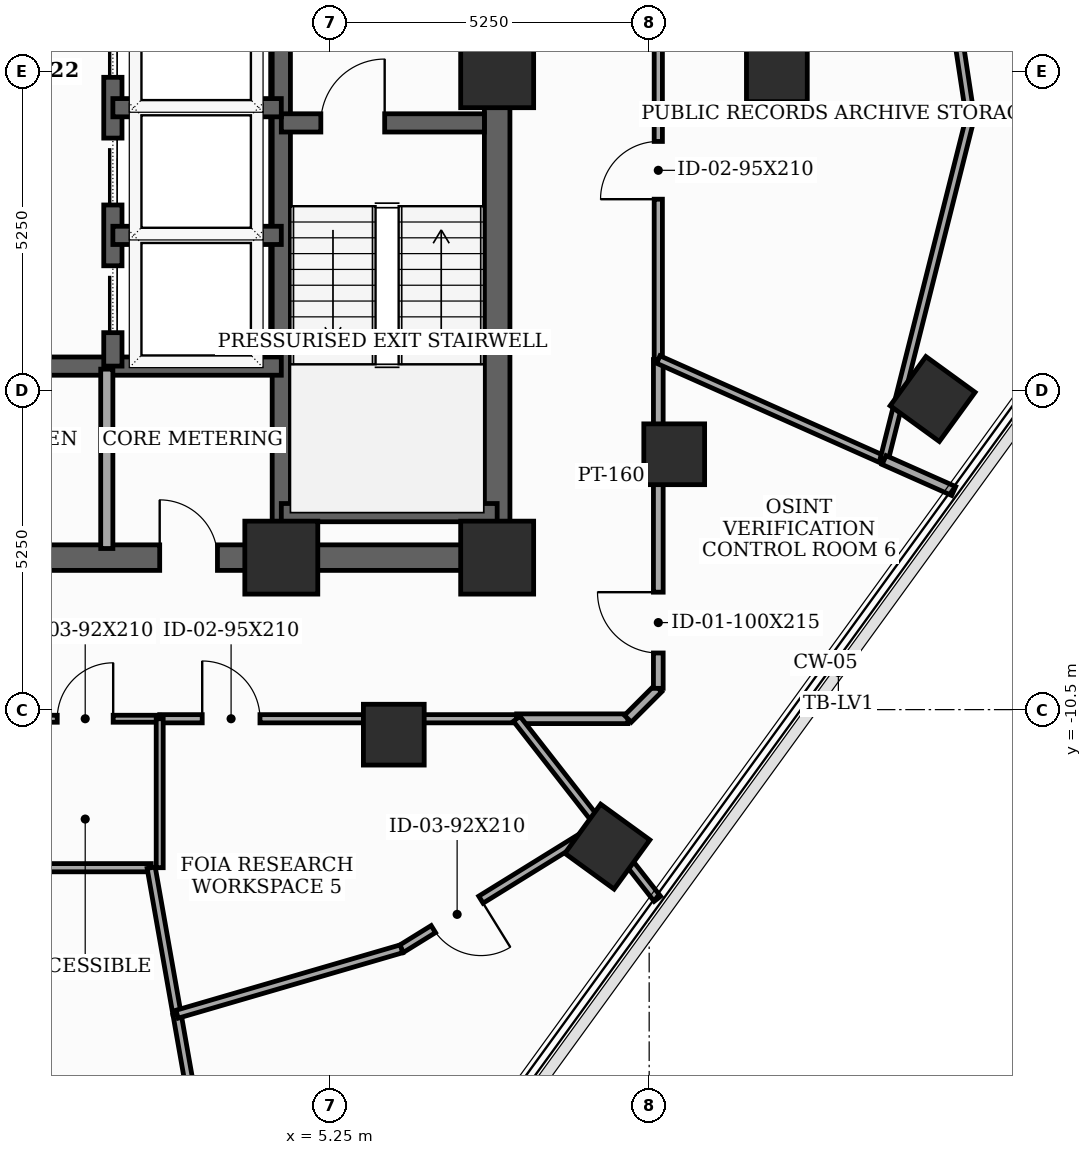
"""IFC4 building model, lengths in metres.
Left out: names, types, materials, properties, quantities, classifications, styles, units other than length and angle.
Written with IfcOpenShell. Run it as: python <this file> out.ifc"""

import sys

from ifc_helpers import new_model, si_unit, direction, frame, frame_2d, origin, origin_2d, place, context, subcontext, project, spatial, rectangle, extrude, element, fill, save


model = new_model("IFC4")
c1 = context("Model", 3, precision=1e-05, world=origin(), true_north=direction((0.0, 1.0)))
c2 = subcontext(c1, "Body", "Model", "MODEL_VIEW")
j1 = project(units=[si_unit("LENGTHUNIT", "METRE"), si_unit("PLANEANGLEUNIT", "RADIAN")], contexts=[c1])
p1 = place(None, origin())
s1 = spatial("IfcSite", under=j1, at=p1, CompositionType="ELEMENT")
p2 = place(p1, origin())
s2 = spatial("IfcBuilding", under=s1, at=p2, CompositionType="ELEMENT")
p3 = place(p2, frame((0.0, 0.0, 233.7)))
s3 = spatial("IfcBuildingStorey", under=s2, at=p3, CompositionType="ELEMENT", Elevation=233.7)
for number, where, z_axis, x_axis in (
    (1, (4.45, -8.0, 0.0), (0.0, 0.0, 1.0), (1.0, 0.0, 0.0)),
    (2, (8.0, -8.0, 0.0), (0.0, 0.0, 1.0), (1.0, 0.0, 0.0)),
    (3, (8.0, 0.0, 0.0), (0.0, 0.0, 1.0), (1.0, 0.0, 0.0)),
):
    element("IfcColumn", number, at=place(p3, frame(where, z_axis=z_axis, x_axis=x_axis)), inside=s3, PredefinedType="COLUMN", context=c2, shape_type="SweptSolid", body=[
        extrude(rectangle(XDim=1.2, YDim=1.2, at=origin_2d()), origin(), (0.0, 0.0, 1.0), 3.7),
    ])
for number, where, z_axis, x_axis in (
    (4, (12.6, 0.0, 0.0), (0.0, 0.0, 1.0), (1.0, 0.0, 0.0)),
    (5, (6.3, -10.912, 0.0), (0.0, 0.0, 1.0), (1.0, 0.0, 0.0)),
    (6, (10.912, -6.3, 0.0), (0.0, 0.0, 1.0), (1.0, 0.0, 0.0)),
    (7, (9.812, -12.753, 0.0), (0.0, 0.0, 1.0), (0.588, 0.809, 0.0)),
    (8, (15.161, -5.391, 0.0), (0.0, 0.0, 1.0), (0.588, 0.809, 0.0)),
):
    element("IfcColumn", number, at=place(p3, frame(where, z_axis=z_axis, x_axis=x_axis)), inside=s3, PredefinedType="COLUMN", context=c2, shape_type="SweptSolid", body=[
        extrude(rectangle(XDim=1.0, YDim=1.0, at=origin_2d()), origin(), (0.0, 0.0, 1.0), 3.7),
    ])
p4 = place(p3, frame((8.0, -8.0, 0.0), z_axis=(0.0, 0.0, 1.0), x_axis=(0.0, 1.0, 0.0)))
e9 = element("IfcWall", 9, at=p4, inside=s3, PredefinedType="SHEAR", context=c2, shape_type="SweptSolid", body=[
    extrude(rectangle(XDim=16.0, YDim=0.42, at=frame_2d((8.0, 0.0))), origin(), (0.0, 0.0, 1.0), 3.5),
])
p5 = place(p4, frame((9.6, 0.0, 0.0)))
e10 = element("IfcOpeningElement", 10, at=p5, cuts=e9, PredefinedType="OPENING", context=c2, shape_type="SweptSolid", body=[
    extrude(rectangle(XDim=1.05, YDim=2.15, at=frame_2d((0.525, 1.075))), frame((0.0, 0.22, 0.0), z_axis=(0.0, -1.0, 0.0), x_axis=(1.0, 0.0, 0.0)), (0.0, 0.0, 1.0), 0.44),
])
p6 = place(p4, frame((14.389, 0.0, 0.0)))
e11 = element("IfcOpeningElement", 11, at=p6, cuts=e9, PredefinedType="OPENING", context=c2, shape_type="SweptSolid", body=[
    extrude(rectangle(XDim=0.85, YDim=2.02, at=frame_2d((0.425, 1.01))), frame((0.0, 0.22, 0.0), z_axis=(0.0, -1.0, 0.0), x_axis=(1.0, 0.0, 0.0)), (0.0, 0.0, 1.0), 0.44),
])
p7 = place(p3, frame((-8.0, -8.0, 0.0), z_axis=(0.0, 0.0, 1.0), x_axis=(1.0, 0.0, 0.0)))
e12 = element("IfcWall", 12, at=p7, inside=s3, PredefinedType="SHEAR", context=c2, shape_type="SweptSolid", body=[
    extrude(rectangle(XDim=16.0, YDim=0.42, at=frame_2d((8.0, 0.0))), origin(), (0.0, 0.0, 1.0), 3.5),
])
p8 = place(p7, frame((4.6, 0.0, 0.0)))
e13 = element("IfcOpeningElement", 13, at=p8, cuts=e12, PredefinedType="OPENING", context=c2, shape_type="SweptSolid", body=[
    extrude(rectangle(XDim=0.95, YDim=2.1, at=frame_2d((0.475, 1.05))), frame((0.0, 0.22, 0.0), z_axis=(0.0, -1.0, 0.0), x_axis=(1.0, 0.0, 0.0)), (0.0, 0.0, 1.0), 0.44),
])
p9 = place(p7, frame((7.52, 0.0, 0.0)))
e14 = element("IfcOpeningElement", 14, at=p9, cuts=e12, PredefinedType="OPENING", context=c2, shape_type="SweptSolid", body=[
    extrude(rectangle(XDim=0.95, YDim=2.1, at=frame_2d((0.475, 1.05))), frame((0.0, 0.22, 0.0), z_axis=(0.0, -1.0, 0.0), x_axis=(1.0, 0.0, 0.0)), (0.0, 0.0, 1.0), 0.44),
])
p10 = place(p7, frame((10.45, 0.0, 0.0)))
e15 = element("IfcOpeningElement", 15, at=p10, cuts=e12, PredefinedType="OPENING", context=c2, shape_type="SweptSolid", body=[
    extrude(rectangle(XDim=0.95, YDim=2.1, at=frame_2d((0.475, 1.05))), frame((0.0, 0.22, 0.0), z_axis=(0.0, -1.0, 0.0), x_axis=(1.0, 0.0, 0.0)), (0.0, 0.0, 1.0), 0.44),
])
p11 = place(p3, frame((4.45, -7.79, 0.0), z_axis=(0.0, 0.0, 1.0), x_axis=(0.0, 1.0, 0.0)))
e16 = element("IfcWall", 16, at=p11, inside=s3, PredefinedType="SHEAR", context=c2, shape_type="SweptSolid", body=[
    extrude(rectangle(XDim=15.58, YDim=0.3, at=frame_2d((7.79, 0.0))), origin(), (0.0, 0.0, 1.0), 3.5),
])
p12 = place(p3, frame((4.45, -0.85, 0.0), z_axis=(0.0, 0.0, 1.0), x_axis=(1.0, 0.0, 0.0)))
e17 = element("IfcWall", 17, at=p12, inside=s3, PredefinedType="SHEAR", context=c2, shape_type="SweptSolid", body=[
    extrude(rectangle(XDim=3.34, YDim=0.3, at=frame_2d((1.67, 0.0))), origin(), (0.0, 0.0, 1.0), 3.5),
])
p13 = place(p12, frame((0.65, 0.0, 0.0)))
e18 = element("IfcOpeningElement", 18, at=p13, cuts=e17, PredefinedType="OPENING", context=c2, shape_type="SweptSolid", body=[
    extrude(rectangle(XDim=1.05, YDim=2.15, at=frame_2d((0.525, 1.075))), frame((0.0, 0.16, 0.0), z_axis=(0.0, -1.0, 0.0), x_axis=(1.0, 0.0, 0.0)), (0.0, 0.0, 1.0), 0.32),
])
p14 = place(p3, frame((4.45, -7.26, 0.0), z_axis=(0.0, 0.0, 1.0), x_axis=(1.0, 0.0, 0.0)))
e19 = element("IfcWall", 19, at=p14, inside=s3, PredefinedType="SHEAR", context=c2, shape_type="SweptSolid", body=[
    extrude(rectangle(XDim=3.55, YDim=0.3, at=frame_2d((1.775, 0.0))), origin(), (0.0, 0.0, 1.0), 3.5),
])
p15 = place(p3, frame((-4.45, -4.85, 0.0), z_axis=(0.0, 0.0, 1.0), x_axis=(1.0, 0.0, 0.0)))
e20 = element("IfcWall", 20, at=p15, inside=s3, PredefinedType="SHEAR", context=c2, shape_type="SweptSolid", body=[
    extrude(rectangle(XDim=8.9, YDim=0.3, at=frame_2d((4.45, 0.0))), origin(), (0.0, 0.0, 1.0), 3.5),
])
p16 = place(p3, frame((1.68, -4.85, 0.0), z_axis=(0.0, 0.0, 1.0), x_axis=(0.0, 1.0, 0.0)))
e21 = element("IfcWall", 21, at=p16, inside=s3, PredefinedType="SHEAR", context=c2, shape_type="SweptSolid", body=[
    extrude(rectangle(XDim=12.64, YDim=0.3, at=frame_2d((6.32, 0.0))), origin(), (0.0, 0.0, 1.0), 3.5),
])
p17 = place(p16, frame((0.55, 0.0, 0.0)))
e22 = element("IfcOpeningElement", 22, at=p17, cuts=e21, PredefinedType="OPENING", context=c2, shape_type="SweptSolid", body=[
    extrude(rectangle(XDim=1.1, YDim=2.1, at=frame_2d((0.55, 1.05))), frame((0.0, 0.16, 0.0), z_axis=(0.0, -1.0, 0.0), x_axis=(1.0, 0.0, 0.0)), (0.0, 0.0, 1.0), 0.32),
])
p18 = place(p16, frame((2.65, 0.0, 0.0)))
e23 = element("IfcOpeningElement", 23, at=p18, cuts=e21, PredefinedType="OPENING", context=c2, shape_type="SweptSolid", body=[
    extrude(rectangle(XDim=1.1, YDim=2.1, at=frame_2d((0.55, 1.05))), frame((0.0, 0.16, 0.0), z_axis=(0.0, -1.0, 0.0), x_axis=(1.0, 0.0, 0.0)), (0.0, 0.0, 1.0), 0.32),
])
p19 = place(p16, frame((4.75, 0.0, 0.0)))
e24 = element("IfcOpeningElement", 24, at=p19, cuts=e21, PredefinedType="OPENING", context=c2, shape_type="SweptSolid", body=[
    extrude(rectangle(XDim=1.1, YDim=2.1, at=frame_2d((0.55, 1.05))), frame((0.0, 0.16, 0.0), z_axis=(0.0, -1.0, 0.0), x_axis=(1.0, 0.0, 0.0)), (0.0, 0.0, 1.0), 0.32),
])
p20 = place(p16, frame((6.8, 0.0, 0.0)))
e25 = element("IfcOpeningElement", 25, at=p20, cuts=e21, PredefinedType="OPENING", context=c2, shape_type="SweptSolid", body=[
    extrude(rectangle(XDim=0.92, YDim=2.1, at=frame_2d((0.46, 1.05))), frame((0.0, 0.16, 0.0), z_axis=(0.0, -1.0, 0.0), x_axis=(1.0, 0.0, 0.0)), (0.0, 0.0, 1.0), 0.32),
])
p21 = place(p16, frame((9.8, 0.0, 0.0)))
e26 = element("IfcOpeningElement", 26, at=p21, cuts=e21, PredefinedType="OPENING", context=c2, shape_type="SweptSolid", body=[
    extrude(rectangle(XDim=0.95, YDim=2.1, at=frame_2d((0.475, 1.05))), frame((0.0, 0.16, 0.0), z_axis=(0.0, -1.0, 0.0), x_axis=(1.0, 0.0, 0.0)), (0.0, 0.0, 1.0), 0.32),
])
for number, where, z_axis, x_axis in (
    (27, (1.68, -2.7, 0.0), (0.0, 0.0, 1.0), (1.0, 0.0, 0.0)),
    (28, (1.68, -0.6, 0.0), (0.0, 0.0, 1.0), (1.0, 0.0, 0.0)),
):
    element("IfcWall", number, at=place(p3, frame(where, z_axis=z_axis, x_axis=x_axis)), inside=s3, PredefinedType="SHEAR", context=c2, shape_type="SweptSolid", body=[
        extrude(rectangle(XDim=2.77, YDim=0.3, at=frame_2d((1.385, 0.0))), origin(), (0.0, 0.0, 1.0), 3.5),
    ])
p22 = place(p3, frame((1.58, -7.85, 0.0), z_axis=(0.0, 0.0, 1.0), x_axis=(0.0, 1.0, 0.0)))
e29 = element("IfcWall", 29, at=p22, inside=s3, PredefinedType="SOLIDWALL", context=c2, shape_type="SweptSolid", body=[
    extrude(rectangle(XDim=2.95, YDim=0.2, at=frame_2d((1.475, 0.0))), origin(), (0.0, 0.0, 1.0), 2.885),
])
p23 = place(p3, frame((10.65, -4.742, 0.0), z_axis=(0.0, 0.0, 1.0), x_axis=(0.0, 1.0, 0.0)))
e30 = element("IfcWall", 30, at=p23, inside=s3, PredefinedType="PARTITIONING", context=c2, shape_type="SweptSolid", body=[
    extrude(rectangle(XDim=6.224, YDim=0.135, at=frame_2d((3.112, 0.0))), origin(), (0.0, 0.0, 1.0), 2.885),
])
p24 = place(p23, frame((2.637, 0.0, 0.0)))
e31 = element("IfcOpeningElement", 31, at=p24, cuts=e30, PredefinedType="OPENING", context=c2, shape_type="SweptSolid", body=[
    extrude(rectangle(XDim=0.95, YDim=2.1, at=frame_2d((0.475, 1.05))), frame((0.0, 0.077, 0.0), z_axis=(0.0, -1.0, 0.0), x_axis=(1.0, 0.0, 0.0)), (0.0, 0.0, 1.0), 0.155),
])
p25 = place(p3, frame((0.0, -10.65, 0.0), z_axis=(0.0, 0.0, 1.0), x_axis=(1.0, 0.0, 0.0)))
e32 = element("IfcWall", 32, at=p25, inside=s3, PredefinedType="PARTITIONING", context=c2, shape_type="SweptSolid", body=[
    extrude(rectangle(XDim=2.45, YDim=0.115, at=frame_2d((1.225, 0.0))), origin(), (0.0, 0.0, 1.0), 3.5),
])
p26 = place(p25, frame((0.765, 0.0, 0.0)))
e33 = element("IfcOpeningElement", 33, at=p26, cuts=e32, PredefinedType="OPENING", context=c2, shape_type="SweptSolid", body=[
    extrude(rectangle(XDim=0.92, YDim=2.1, at=frame_2d((0.46, 1.05))), frame((0.0, 0.067, 0.0), z_axis=(0.0, -1.0, 0.0), x_axis=(1.0, 0.0, 0.0)), (0.0, 0.0, 1.0), 0.135),
])
p27 = place(p3, frame((2.45, -10.65, 0.0), z_axis=(0.0, 0.0, 1.0), x_axis=(1.0, 0.0, 0.0)))
e34 = element("IfcWall", 34, at=p27, inside=s3, PredefinedType="PARTITIONING", context=c2, shape_type="SweptSolid", body=[
    extrude(rectangle(XDim=5.871, YDim=0.135, at=frame_2d((2.936, 0.0))), origin(), (0.0, 0.0, 1.0), 2.885),
])
p28 = place(p27, frame((0.699, 0.0, 0.0)))
e35 = element("IfcOpeningElement", 35, at=p28, cuts=e34, PredefinedType="OPENING", context=c2, shape_type="SweptSolid", body=[
    extrude(rectangle(XDim=0.95, YDim=2.1, at=frame_2d((0.475, 1.05))), frame((0.0, 0.077, 0.0), z_axis=(0.0, -1.0, 0.0), x_axis=(1.0, 0.0, 0.0)), (0.0, 0.0, 1.0), 0.155),
])
p29 = place(p3, frame((8.321, -10.65, 0.0), z_axis=(0.0, 0.0, 1.0), x_axis=(1.0, 0.0, 0.0)))
e36 = element("IfcWall", 36, at=p29, inside=s3, PredefinedType="PARTITIONING", context=c2, shape_type="SweptSolid", body=[
    extrude(rectangle(XDim=1.829, YDim=0.16, at=frame_2d((0.915, 0.0))), origin(), (0.0, 0.0, 1.0), 3.5),
])
p30 = place(p3, frame((10.15, -10.65, 0.0), z_axis=(0.0, 0.0, 1.0), x_axis=(0.707106781187, 0.707106781187, 0.0)))
e37 = element("IfcWall", 37, at=p30, inside=s3, PredefinedType="PARTITIONING", context=c2, shape_type="SweptSolid", body=[
    extrude(rectangle(XDim=0.707, YDim=0.16, at=frame_2d((0.354, 0.0))), origin(), (0.0, 0.0, 1.0), 3.5),
])
p31 = place(p3, frame((10.65, -10.15, 0.0), z_axis=(0.0, 0.0, 1.0), x_axis=(0.0, 1.0, 0.0)))
e38 = element("IfcWall", 38, at=p31, inside=s3, PredefinedType="PARTITIONING", context=c2, shape_type="SweptSolid", body=[
    extrude(rectangle(XDim=5.408, YDim=0.16, at=frame_2d((2.704, 0.0))), origin(), (0.0, 0.0, 1.0), 2.885),
])
p32 = place(p31, frame((0.582, 0.0, 0.0)))
e39 = element("IfcOpeningElement", 39, at=p32, cuts=e38, PredefinedType="OPENING", context=c2, shape_type="SweptSolid", body=[
    extrude(rectangle(XDim=1.0, YDim=2.15, at=frame_2d((0.5, 1.075))), frame((0.0, 0.09, 0.0), z_axis=(0.0, -1.0, 0.0), x_axis=(1.0, 0.0, 0.0)), (0.0, 0.0, 1.0), 0.18),
])
p33 = place(p3, frame((10.65, -4.742, 0.0), z_axis=(0.0, 0.0, 1.0), x_axis=(0.913556239153, -0.406712426544, 0.0)))
e40 = element("IfcWall", 40, at=p33, inside=s3, PredefinedType="PARTITIONING", context=c2, shape_type="SweptSolid", body=[
    extrude(rectangle(XDim=4.064, YDim=0.135, at=frame_2d((2.032, 0.0))), origin(), (0.0, 0.0, 1.0), 2.885),
])
p34 = place(p3, frame((14.363, -6.395, 0.0), z_axis=(0.0, 0.0, 1.0), x_axis=(0.244106617879, 0.969748399899, 0.0)))
e41 = element("IfcWall", 41, at=p34, inside=s3, PredefinedType="PARTITIONING", context=c2, shape_type="SweptSolid", body=[
    extrude(rectangle(XDim=5.813, YDim=0.135, at=frame_2d((2.906, 0.0))), origin(), (0.0, 0.0, 1.0), 2.985),
])
p35 = place(p3, frame((15.782, -0.758, 0.0), z_axis=(0.0, 0.0, 1.0), x_axis=(-0.150025845784, 0.988682075086, 0.0)))
e42 = element("IfcWall", 42, at=p35, inside=s3, PredefinedType="PARTITIONING", context=c2, shape_type="SweptSolid", body=[
    extrude(rectangle(XDim=6.233, YDim=0.135, at=frame_2d((3.116, 0.0))), origin(), (0.0, 0.0, 1.0), 2.985),
])
p36 = place(p35, frame((2.656, 0.0, 0.0)))
e43 = element("IfcOpeningElement", 43, at=p36, cuts=e42, PredefinedType="OPENING", context=c2, shape_type="SweptSolid", body=[
    extrude(rectangle(XDim=0.92, YDim=2.1, at=frame_2d((0.46, 1.05))), frame((0.0, 0.077, 0.0), z_axis=(0.0, -1.0, 0.0), x_axis=(1.0, 0.0, 0.0)), (0.0, 0.0, 1.0), 0.155),
])
p37 = place(p3, frame((2.31, -13.1, 0.0), z_axis=(0.0, 0.0, 1.0), x_axis=(-1.0, 0.0, 0.0)))
e44 = element("IfcWall", 44, at=p37, inside=s3, PredefinedType="PARTITIONING", context=c2, shape_type="SweptSolid", body=[
    extrude(rectangle(XDim=2.31, YDim=0.135, at=frame_2d((1.155, 0.0))), origin(), (0.0, 0.0, 1.0), 2.985),
])
p38 = place(p3, frame((4.009, -22.732, 0.0), z_axis=(0.0, 0.0, 1.0), x_axis=(-0.173639103053, 0.984809353068, 0.0)))
e45 = element("IfcWall", 45, at=p38, inside=s3, PredefinedType="PARTITIONING", context=c2, shape_type="SweptSolid", body=[
    extrude(rectangle(XDim=7.334, YDim=0.135, at=frame_2d((3.667, 0.0))), origin(), (0.0, 0.0, 1.0), 2.985),
])
p39 = place(p3, frame((2.735, -15.51, 0.0), z_axis=(0.0, 0.0, 1.0), x_axis=(-0.173694270709, 0.984799624453, 0.0)))
e46 = element("IfcWall", 46, at=p39, inside=s3, PredefinedType="PARTITIONING", context=c2, shape_type="SweptSolid", body=[
    extrude(rectangle(XDim=2.447, YDim=0.135, at=frame_2d((1.224, 0.0))), origin(), (0.0, 0.0, 1.0), 3.5),
])
p40 = place(p3, frame((2.45, -13.1, 0.0), z_axis=(0.0, 0.0, 1.0), x_axis=(0.0, 1.0, 0.0)))
e47 = element("IfcWall", 47, at=p40, inside=s3, PredefinedType="PARTITIONING", context=c2, shape_type="SweptSolid", body=[
    extrude(rectangle(XDim=2.45, YDim=0.115, at=frame_2d((1.225, 0.0))), origin(), (0.0, 0.0, 1.0), 2.885),
])
p41 = place(p3, frame((9.696, -12.411, 0.0), z_axis=(0.0, 0.0, 1.0), x_axis=(-0.850393663863, -0.526146953295, 0.0)))
e48 = element("IfcWall", 48, at=p41, inside=s3, PredefinedType="PARTITIONING", context=c2, shape_type="SweptSolid", body=[
    extrude(rectangle(XDim=3.845, YDim=0.135, at=frame_2d((1.923, 0.0))), origin(), (0.0, 0.0, 1.0), 2.985),
])
p42 = place(p41, frame((2.309, 0.0, 0.0)))
e49 = element("IfcOpeningElement", 49, at=p42, cuts=e48, PredefinedType="OPENING", context=c2, shape_type="SweptSolid", body=[
    extrude(rectangle(XDim=0.92, YDim=2.1, at=frame_2d((0.46, 1.05))), frame((0.0, 0.077, 0.0), z_axis=(0.0, -1.0, 0.0), x_axis=(1.0, 0.0, 0.0)), (0.0, 0.0, 1.0), 0.155),
])
p43 = place(p3, frame((6.426, -14.434, 0.0), z_axis=(0.0, 0.0, 1.0), x_axis=(-0.960041241254, -0.279858562654, 0.0)))
e50 = element("IfcWall", 50, at=p43, inside=s3, PredefinedType="PARTITIONING", context=c2, shape_type="SweptSolid", body=[
    extrude(rectangle(XDim=3.844, YDim=0.135, at=frame_2d((1.922, 0.0))), origin(), (0.0, 0.0, 1.0), 3.5),
])
p44 = place(p3, frame((10.635, -13.612, 0.0), z_axis=(0.0, 0.0, 1.0), x_axis=(-0.615768345532, 0.787927245779, 0.0)))
e51 = element("IfcWall", 51, at=p44, inside=s3, PredefinedType="PARTITIONING", context=c2, shape_type="SweptSolid", body=[
    extrude(rectangle(XDim=1.524, YDim=0.135, at=frame_2d((0.762, 0.0))), origin(), (0.0, 0.0, 1.0), 2.985),
])
p45 = place(p3, frame((9.696, -12.411, 0.0), z_axis=(0.0, 0.0, 1.0), x_axis=(-0.615429845305, 0.788191668002, 0.0)))
e52 = element("IfcWall", 52, at=p45, inside=s3, PredefinedType="PARTITIONING", context=c2, shape_type="SweptSolid", body=[
    extrude(rectangle(XDim=2.234, YDim=0.135, at=frame_2d((1.117, 0.0))), origin(), (0.0, 0.0, 1.0), 2.985),
])
p46 = place(p3, frame((15.508, -6.905, 0.0), z_axis=(0.0, 0.0, 1.0), x_axis=(-0.913626692327, 0.406554137929, 0.0)))
e53 = element("IfcWall", 53, at=p46, inside=s3, PredefinedType="PARTITIONING", context=c2, shape_type="SweptSolid", body=[
    extrude(rectangle(XDim=1.253, YDim=0.16, at=frame_2d((0.626, 0.0))), origin(), (0.0, 0.0, 1.0), 3.035),
])
p47 = place(p10, origin())
e54 = element("IfcDoor", 54, at=p47, inside=s3, OperationType="SINGLE_SWING_LEFT", PredefinedType="DOOR", context=c2, shape_type="SweptSolid", body=[
    extrude(rectangle(XDim=0.95, YDim=2.1, at=frame_2d((0.475, 1.05))), frame((0.0, 0.025, 0.0), z_axis=(0.0, -1.0, 0.0), x_axis=(1.0, 0.0, 0.0)), (0.0, 0.0, 1.0), 0.05),
])
fill(e15, e54)
p48 = place(p13, origin())
e55 = element("IfcDoor", 55, at=p48, inside=s3, OperationType="SINGLE_SWING_RIGHT", PredefinedType="DOOR", context=c2, shape_type="SweptSolid", body=[
    extrude(rectangle(XDim=1.05, YDim=2.15, at=frame_2d((0.525, 1.075))), frame((0.0, 0.025, 0.0), z_axis=(0.0, -1.0, 0.0), x_axis=(1.0, 0.0, 0.0)), (0.0, 0.0, 1.0), 0.05),
])
fill(e18, e55)
p49 = place(p17, origin())
e56 = element("IfcDoor", 56, at=p49, inside=s3, OperationType="SLIDING_TO_LEFT", PredefinedType="DOOR", context=c2, shape_type="SweptSolid", body=[
    extrude(rectangle(XDim=1.1, YDim=2.1, at=frame_2d((0.55, 1.05))), frame((0.0, 0.025, 0.0), z_axis=(0.0, -1.0, 0.0), x_axis=(1.0, 0.0, 0.0)), (0.0, 0.0, 1.0), 0.05),
])
fill(e22, e56)
p50 = place(p18, origin())
e57 = element("IfcDoor", 57, at=p50, inside=s3, OperationType="SLIDING_TO_LEFT", PredefinedType="DOOR", context=c2, shape_type="SweptSolid", body=[
    extrude(rectangle(XDim=1.1, YDim=2.1, at=frame_2d((0.55, 1.05))), frame((0.0, 0.025, 0.0), z_axis=(0.0, -1.0, 0.0), x_axis=(1.0, 0.0, 0.0)), (0.0, 0.0, 1.0), 0.05),
])
fill(e23, e57)
p51 = place(p19, origin())
e58 = element("IfcDoor", 58, at=p51, inside=s3, OperationType="SLIDING_TO_LEFT", PredefinedType="DOOR", context=c2, shape_type="SweptSolid", body=[
    extrude(rectangle(XDim=1.1, YDim=2.1, at=frame_2d((0.55, 1.05))), frame((0.0, 0.025, 0.0), z_axis=(0.0, -1.0, 0.0), x_axis=(1.0, 0.0, 0.0)), (0.0, 0.0, 1.0), 0.05),
])
fill(e24, e58)
p52 = place(p24, origin())
e59 = element("IfcDoor", 59, at=p52, inside=s3, OperationType="SINGLE_SWING_LEFT", PredefinedType="DOOR", context=c2, shape_type="SweptSolid", body=[
    extrude(rectangle(XDim=0.95, YDim=2.1, at=frame_2d((0.475, 1.05))), frame((0.0, 0.025, 0.0), z_axis=(0.0, -1.0, 0.0), x_axis=(1.0, 0.0, 0.0)), (0.0, 0.0, 1.0), 0.05),
])
fill(e31, e59)
p53 = place(p26, origin())
e60 = element("IfcDoor", 60, at=p53, inside=s3, OperationType="SINGLE_SWING_RIGHT", PredefinedType="DOOR", context=c2, shape_type="SweptSolid", body=[
    extrude(rectangle(XDim=0.92, YDim=2.1, at=frame_2d((0.46, 1.05))), frame((0.0, 0.025, 0.0), z_axis=(0.0, -1.0, 0.0), x_axis=(1.0, 0.0, 0.0)), (0.0, 0.0, 1.0), 0.05),
])
fill(e33, e60)
p54 = place(p28, origin())
e61 = element("IfcDoor", 61, at=p54, inside=s3, OperationType="SINGLE_SWING_LEFT", PredefinedType="DOOR", context=c2, shape_type="SweptSolid", body=[
    extrude(rectangle(XDim=0.95, YDim=2.1, at=frame_2d((0.475, 1.05))), frame((0.0, 0.025, 0.0), z_axis=(0.0, -1.0, 0.0), x_axis=(1.0, 0.0, 0.0)), (0.0, 0.0, 1.0), 0.05),
])
fill(e35, e61)
p55 = place(p32, origin())
e62 = element("IfcDoor", 62, at=p55, inside=s3, OperationType="SINGLE_SWING_RIGHT", PredefinedType="DOOR", context=c2, shape_type="SweptSolid", body=[
    extrude(rectangle(XDim=1.0, YDim=2.15, at=frame_2d((0.5, 1.075))), frame((0.0, 0.025, 0.0), z_axis=(0.0, -1.0, 0.0), x_axis=(1.0, 0.0, 0.0)), (0.0, 0.0, 1.0), 0.05),
])
fill(e39, e62)
p56 = place(p42, origin())
e63 = element("IfcDoor", 63, at=p56, inside=s3, OperationType="SINGLE_SWING_LEFT", PredefinedType="DOOR", context=c2, shape_type="SweptSolid", body=[
    extrude(rectangle(XDim=0.92, YDim=2.1, at=frame_2d((0.46, 1.05))), frame((0.0, 0.025, 0.0), z_axis=(0.0, -1.0, 0.0), x_axis=(1.0, 0.0, 0.0)), (0.0, 0.0, 1.0), 0.05),
])
fill(e49, e63)
save(model, sys.argv[1])
